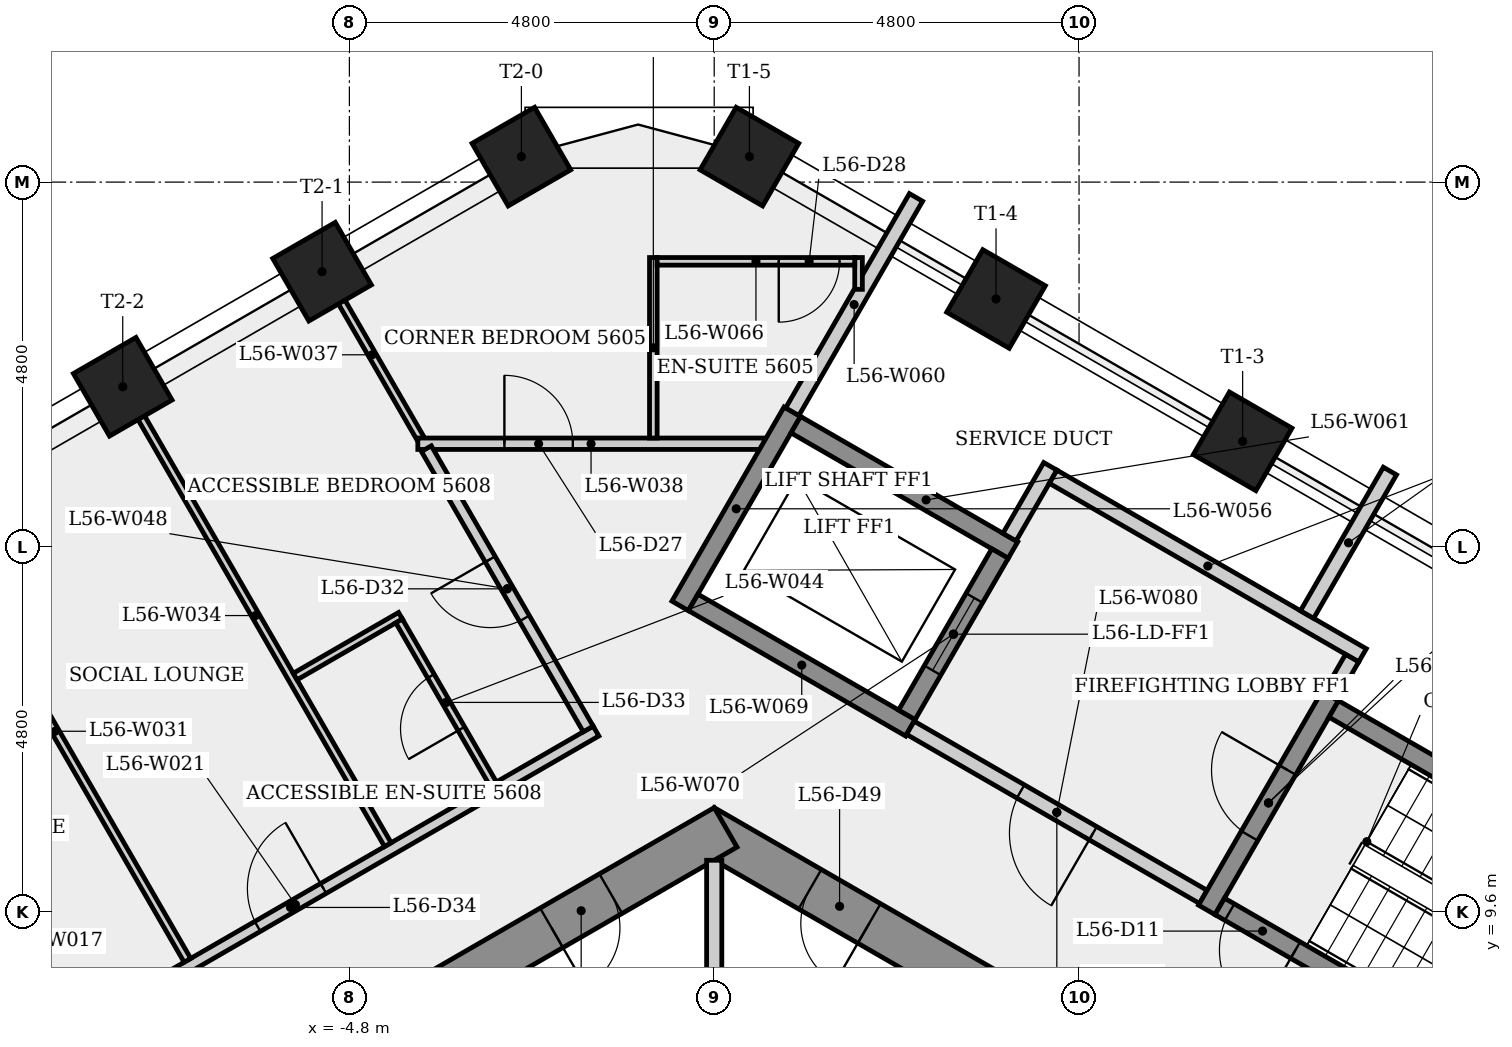
"""IFC4 building model, lengths in metres.
Left out: names, types, materials, properties, quantities, classifications, styles, units other than length and angle.
Written with IfcOpenShell. Run it as: python <this file> out.ifc"""

import sys

from ifc_helpers import new_model, si_unit, direction, frame, frame_2d, origin, origin_2d, place, context, subcontext, project, spatial, rectangle, extrude, element, fill, save


model = new_model("IFC4")
c1 = context("Model", 3, precision=1e-05, world=origin(), true_north=direction((0.0, 1.0)))
c2 = subcontext(c1, "Body", "Model", "MODEL_VIEW")
j1 = project(units=[si_unit("LENGTHUNIT", "METRE"), si_unit("PLANEANGLEUNIT", "RADIAN")], contexts=[c1])
p1 = place(None, origin())
s1 = spatial("IfcSite", under=j1, at=p1, CompositionType="ELEMENT")
p2 = place(p1, origin())
s2 = spatial("IfcBuilding", under=s1, at=p2, CompositionType="ELEMENT")
p3 = place(p2, frame((0.0, 0.0, 210.1)))
s3 = spatial("IfcBuildingStorey", under=s2, at=p3, CompositionType="ELEMENT", Elevation=210.1)
p4 = place(p3, frame((9.35, 5.225, 0.0), z_axis=(0.0, 0.0, 1.0), x_axis=(-0.866023993627, 0.500002442456, 0.0)))
e1 = element("IfcWall", 1, at=p4, inside=s3, PredefinedType="SHEAR", context=c2, shape_type="SweptSolid", body=[
    extrude(rectangle(XDim=10.97, YDim=0.6, at=frame_2d((5.485, 0.0))), origin(), (0.0, 0.0, 1.0), 4.0),
])
p5 = place(p4, frame((8.442, 0.0, 0.0)))
e2 = element("IfcOpeningElement", 2, at=p5, cuts=e1, PredefinedType="OPENING", context=c2, shape_type="SweptSolid", body=[
    extrude(rectangle(XDim=0.9, YDim=2.1, at=frame_2d((0.45, 1.05))), frame((0.0, 0.31, 0.0), z_axis=(0.0, -1.0, 0.0), x_axis=(1.0, 0.0, 0.0)), (0.0, 0.0, 1.0), 0.62),
])
p6 = place(p4, frame((1.634, 0.0, 0.0)))
e3 = element("IfcOpeningElement", 3, at=p6, cuts=e1, PredefinedType="OPENING", context=c2, shape_type="SweptSolid", body=[
    extrude(rectangle(XDim=0.9, YDim=2.1, at=frame_2d((0.45, 1.05))), frame((0.0, 0.31, 0.0), z_axis=(0.0, -1.0, 0.0), x_axis=(1.0, 0.0, 0.0)), (0.0, 0.0, 1.0), 0.62),
])
p7 = place(p3, frame((0.15, 10.71, 0.0), z_axis=(0.0, 0.0, 1.0), x_axis=(-0.866023993627, -0.500002442456, 0.0)))
e4 = element("IfcWall", 4, at=p7, inside=s3, PredefinedType="SHEAR", context=c2, shape_type="SweptSolid", body=[
    extrude(rectangle(XDim=10.97, YDim=0.6, at=frame_2d((5.485, 0.0))), origin(), (0.0, 0.0, 1.0), 4.0),
])
p8 = place(p7, frame((9.201, 0.0, 0.0)))
e5 = element("IfcOpeningElement", 5, at=p8, cuts=e4, PredefinedType="OPENING", context=c2, shape_type="SweptSolid", body=[
    extrude(rectangle(XDim=0.9, YDim=2.1, at=frame_2d((0.45, 1.05))), frame((0.0, 0.31, 0.0), z_axis=(0.0, -1.0, 0.0), x_axis=(1.0, 0.0, 0.0)), (0.0, 0.0, 1.0), 0.62),
])
p9 = place(p7, frame((1.744, 0.0, 0.0)))
e6 = element("IfcOpeningElement", 6, at=p9, cuts=e4, PredefinedType="OPENING", context=c2, shape_type="SweptSolid", body=[
    extrude(rectangle(XDim=0.9, YDim=2.1, at=frame_2d((0.45, 1.05))), frame((0.0, 0.31, 0.0), z_axis=(0.0, -1.0, 0.0), x_axis=(1.0, 0.0, 0.0)), (0.0, 0.0, 1.0), 0.62),
])
for number, where, z_axis, x_axis in (
    (7, (6.953, 15.789, 0.0), (0.0, 0.0, 1.0), (0.5, 0.866, 0.0)),
    (8, (3.708, 17.662, 0.0), (0.0, 0.0, 1.0), (0.5, 0.866, 0.0)),
    (9, (0.463, 19.535, 0.0), (0.0, 0.0, 1.0), (0.5, 0.866, 0.0)),
    (10, (-2.537, 19.535, 0.0), (0.0, 0.0, 1.0), (-0.5, 0.866, 0.0)),
    (11, (-5.159, 18.021, 0.0), (0.0, 0.0, 1.0), (-0.5, 0.866, 0.0)),
    (12, (-7.782, 16.507, 0.0), (0.0, 0.0, 1.0), (-0.5, 0.866, 0.0)),
):
    element("IfcColumn", number, at=place(p3, frame(where, z_axis=z_axis, x_axis=x_axis)), inside=s3, PredefinedType="COLUMN", context=c2, shape_type="SweptSolid", body=[
        extrude(rectangle(XDim=0.95, YDim=0.95, at=origin_2d()), origin(), (0.0, 0.0, 1.0), 4.0),
    ])
p10 = place(p3, frame((-9.465, 7.41, 0.0), z_axis=(0.0, 0.0, 1.0), x_axis=(0.866025334581, 0.500000119864, 0.0)))
e13 = element("IfcWall", 13, at=p10, inside=s3, PredefinedType="PARTITIONING", context=c2, shape_type="SweptSolid", body=[
    extrude(rectangle(XDim=9.133, YDim=0.15, at=frame_2d((4.567, 0.0))), origin(), (0.0, 0.0, 1.0), 3.6),
])
p11 = place(p10, frame((3.992, 0.0, 0.0)))
e14 = element("IfcOpeningElement", 14, at=p11, cuts=e13, PredefinedType="OPENING", context=c2, shape_type="SweptSolid", body=[
    extrude(rectangle(XDim=1.0, YDim=2.1, at=frame_2d((0.5, 1.05))), frame((0.0, 0.085, 0.0), z_axis=(0.0, -1.0, 0.0), x_axis=(1.0, 0.0, 0.0)), (0.0, 0.0, 1.0), 0.17),
])
p12 = place(p3, frame((-6.931, 8.96, 0.0), z_axis=(0.0, 0.0, 1.0), x_axis=(-0.499982511794, 0.866035500369, 0.0)))
e15 = element("IfcWall", 15, at=p12, inside=s3, PredefinedType="PARTITIONING", context=c2, shape_type="SweptSolid", body=[
    extrude(rectangle(XDim=6.962, YDim=0.1, at=frame_2d((3.481, 0.0))), origin(), (0.0, 0.0, 1.0), 3.6),
])
p13 = place(p3, frame((-7.775, 16.511, 0.0), z_axis=(0.0, 0.0, 1.0), x_axis=(0.499997697262, -0.866026733267, 0.0)))
e16 = element("IfcWall", 16, at=p13, inside=s3, PredefinedType="PARTITIONING", context=c2, shape_type="SweptSolid", body=[
    extrude(rectangle(XDim=6.961, YDim=0.1, at=frame_2d((3.481, 0.0))), origin(), (0.0, 0.0, 1.0), 3.6),
])
p14 = place(p3, frame((-4.128, 13.494, 0.0), z_axis=(0.0, 0.0, 1.0), x_axis=(-0.866094119867, -0.499880961361, 0.0)))
e17 = element("IfcWall", 17, at=p14, inside=s3, PredefinedType="PARTITIONING", context=c2, shape_type="SweptSolid", body=[
    extrude(rectangle(XDim=1.6, YDim=0.1, at=frame_2d((0.8, 0.0))), origin(), (0.0, 0.0, 1.0), 3.6),
])
p15 = place(p3, frame((-3.862, 15.823, 0.0), z_axis=(0.0, 0.0, 1.0), x_axis=(-0.5000066933, 0.866021539371, 0.0)))
e18 = element("IfcWall", 18, at=p15, inside=s3, PredefinedType="PARTITIONING", context=c2, shape_type="SweptSolid", body=[
    extrude(rectangle(XDim=2.553, YDim=0.1, at=frame_2d((1.276, 0.0))), origin(), (0.0, 0.0, 1.0), 3.6),
])
p16 = place(p3, frame((-3.899, 15.757, 0.0), z_axis=(0.0, 0.0, 1.0), x_axis=(1.0, 0.0, 0.0)))
e19 = element("IfcWall", 19, at=p16, inside=s3, PredefinedType="PARTITIONING", context=c2, shape_type="SweptSolid", body=[
    extrude(rectangle(XDim=4.558, YDim=0.15, at=frame_2d((2.279, 0.0))), origin(), (0.0, 0.0, 1.0), 3.6),
])
p17 = place(p16, frame((1.139, 0.0, 0.0)))
e20 = element("IfcOpeningElement", 20, at=p17, cuts=e19, PredefinedType="OPENING", context=c2, shape_type="SweptSolid", body=[
    extrude(rectangle(XDim=0.9, YDim=2.1, at=frame_2d((0.45, 1.05))), frame((0.0, 0.085, 0.0), z_axis=(0.0, -1.0, 0.0), x_axis=(1.0, 0.0, 0.0)), (0.0, 0.0, 1.0), 0.17),
])
p18 = place(p3, frame((-2.909, 11.282, 0.0), z_axis=(0.0, 0.0, 1.0), x_axis=(-0.499916002032, 0.866073894602, 0.0)))
e21 = element("IfcWall", 21, at=p18, inside=s3, PredefinedType="PARTITIONING", context=c2, shape_type="SweptSolid", body=[
    extrude(rectangle(XDim=2.475, YDim=0.1, at=frame_2d((1.238, 0.0))), origin(), (0.0, 0.0, 1.0), 3.6),
])
p19 = place(p18, frame((0.837, 0.0, 0.0)))
e22 = element("IfcOpeningElement", 22, at=p19, cuts=e21, PredefinedType="OPENING", context=c2, shape_type="SweptSolid", body=[
    extrude(rectangle(XDim=0.8, YDim=2.1, at=frame_2d((0.4, 1.05))), frame((0.0, 0.06, 0.0), z_axis=(0.0, -1.0, 0.0), x_axis=(1.0, 0.0, 0.0)), (0.0, 0.0, 1.0), 0.12),
])
p20 = place(p3, frame((-1.658, 12.004, 0.0), z_axis=(0.0, 0.0, 1.0), x_axis=(-0.500023511883, 0.866011828767, 0.0)))
e23 = element("IfcWall", 23, at=p20, inside=s3, PredefinedType="PARTITIONING", context=c2, shape_type="SweptSolid", body=[
    extrude(rectangle(XDim=4.259, YDim=0.15, at=frame_2d((2.129, 0.0))), origin(), (0.0, 0.0, 1.0), 3.6),
])
p21 = place(p20, frame((1.679, 0.0, 0.0)))
e24 = element("IfcOpeningElement", 24, at=p21, cuts=e23, PredefinedType="OPENING", context=c2, shape_type="SweptSolid", body=[
    extrude(rectangle(XDim=0.9, YDim=2.1, at=frame_2d((0.45, 1.05))), frame((0.0, 0.085, 0.0), z_axis=(0.0, -1.0, 0.0), x_axis=(1.0, 0.0, 0.0)), (0.0, 0.0, 1.0), 0.17),
])
p22 = place(p3, frame((-0.801, 18.208, 0.0), z_axis=(0.0, 0.0, 1.0), x_axis=(0.0, -1.0, 0.0)))
e25 = element("IfcWall", 25, at=p22, inside=s3, PredefinedType="PARTITIONING", context=c2, shape_type="SweptSolid", body=[
    extrude(rectangle(XDim=2.375, YDim=0.1, at=frame_2d((1.188, 0.0))), origin(), (0.0, 0.0, 1.0), 3.6),
])
p23 = place(p3, frame((-0.448, 13.624, 0.0), z_axis=(0.0, 0.0, 1.0), x_axis=(0.500037662692, 0.866003658127, 0.0)))
e26 = element("IfcWall", 26, at=p23, inside=s3, PredefinedType="SHEAR", context=c2, shape_type="SweptSolid", body=[
    extrude(rectangle(XDim=2.95, YDim=0.25, at=frame_2d((1.475, 0.0))), origin(), (0.0, 0.0, 1.0), 3.6),
])
p24 = place(p3, frame((0.0, 10.277, 0.0), z_axis=(0.0, 0.0, 1.0), x_axis=(0.0, -1.0, 0.0)))
e27 = element("IfcWall", 27, at=p24, inside=s3, PredefinedType="PARTITIONING", context=c2, shape_type="SweptSolid", body=[
    extrude(rectangle(XDim=5.002, YDim=0.2, at=frame_2d((2.501, 0.0))), origin(), (0.0, 0.0, 1.0), 3.6),
])
p25 = place(p3, frame((1.027, 16.179, 0.0), z_axis=(0.0, 0.0, 1.0), x_axis=(0.49995397877, 0.866051972524, 0.0)))
e28 = element("IfcWall", 28, at=p25, inside=s3, PredefinedType="PLUMBINGWALL", context=c2, shape_type="SweptSolid", body=[
    extrude(rectangle(XDim=3.256, YDim=0.2, at=frame_2d((1.628, 0.0))), origin(), (0.0, 0.0, 1.0), 3.6),
])
p26 = place(p3, frame((1.073, 16.008, 0.0), z_axis=(0.0, 0.0, 1.0), x_axis=(0.866040211805, -0.499974350878, 0.0)))
e29 = element("IfcWall", 29, at=p26, inside=s3, PredefinedType="SHEAR", context=c2, shape_type="SweptSolid", body=[
    extrude(rectangle(XDim=3.3, YDim=0.25, at=frame_2d((1.65, 0.0))), origin(), (0.0, 0.0, 1.0), 3.6),
])
p27 = place(p3, frame((1.899, 17.789, 0.0), z_axis=(0.0, 0.0, 1.0), x_axis=(0.0, 1.0, 0.0)))
e30 = element("IfcWall", 30, at=p27, inside=s3, PredefinedType="PARTITIONING", context=c2, shape_type="SweptSolid", body=[
    extrude(rectangle(XDim=0.418, YDim=0.1, at=frame_2d((0.209, 0.0))), origin(), (0.0, 0.0, 1.0), 3.6),
])
p28 = place(p3, frame((1.849, 18.157, 0.0), z_axis=(0.0, 0.0, 1.0), x_axis=(-1.0, 0.0, 0.0)))
e31 = element("IfcWall", 31, at=p28, inside=s3, PredefinedType="PARTITIONING", context=c2, shape_type="SweptSolid", body=[
    extrude(rectangle(XDim=2.6, YDim=0.1, at=frame_2d((1.3, 0.0))), origin(), (0.0, 0.0, 1.0), 3.6),
])
p29 = place(p28, frame((0.2, 0.0, 0.0)))
e32 = element("IfcOpeningElement", 32, at=p29, cuts=e31, PredefinedType="OPENING", context=c2, shape_type="SweptSolid", body=[
    extrude(rectangle(XDim=0.8, YDim=2.1, at=frame_2d((0.4, 1.05))), frame((0.0, 0.06, 0.0), z_axis=(0.0, -1.0, 0.0), x_axis=(1.0, 0.0, 0.0)), (0.0, 0.0, 1.0), 0.12),
])
p30 = place(p3, frame((2.581, 12.02, 0.0), z_axis=(0.0, 0.0, 1.0), x_axis=(-0.866040211805, 0.499974350878, 0.0)))
e33 = element("IfcWall", 33, at=p30, inside=s3, PredefinedType="SHEAR", context=c2, shape_type="SweptSolid", body=[
    extrude(rectangle(XDim=3.3, YDim=0.25, at=frame_2d((1.65, 0.0))), origin(), (0.0, 0.0, 1.0), 3.6),
])
p31 = place(p3, frame((2.535, 12.191, 0.0), z_axis=(0.0, 0.0, 1.0), x_axis=(0.500061746146, 0.865989751695, 0.0)))
e34 = element("IfcWall", 34, at=p31, inside=s3, PredefinedType="SHEAR", context=c2, shape_type="SweptSolid", body=[
    extrude(rectangle(XDim=2.45, YDim=0.25, at=frame_2d((1.225, 0.0))), origin(), (0.0, 0.0, 1.0), 4.0),
])
p32 = place(p31, frame((0.675, 0.0, 0.0)))
e35 = element("IfcOpeningElement", 35, at=p32, cuts=e34, PredefinedType="OPENING", context=c2, shape_type="SweptSolid", body=[
    extrude(rectangle(XDim=1.1, YDim=2.1, at=frame_2d((0.55, 1.05))), frame((0.0, 0.135, 0.0), z_axis=(0.0, -1.0, 0.0), x_axis=(1.0, 0.0, 0.0)), (0.0, 0.0, 1.0), 0.27),
])
p33 = place(p3, frame((3.885, 14.529, 0.0), z_axis=(0.0, 0.0, 1.0), x_axis=(0.499997628298, 0.866026773083, 0.0)))
e36 = element("IfcWall", 36, at=p33, inside=s3, PredefinedType="PLUMBINGWALL", context=c2, shape_type="SweptSolid", body=[
    extrude(rectangle(XDim=1.075, YDim=0.2, at=frame_2d((0.538, 0.0))), origin(), (0.0, 0.0, 1.0), 3.6),
])
p34 = place(p3, frame((4.459, 15.323, 0.0), z_axis=(0.0, 0.0, 1.0), x_axis=(0.866016039709, -0.500016218704, 0.0)))
e37 = element("IfcWall", 37, at=p34, inside=s3, PredefinedType="PLUMBINGWALL", context=c2, shape_type="SweptSolid", body=[
    extrude(rectangle(XDim=4.7, YDim=0.2, at=frame_2d((2.35, 0.0))), origin(), (0.0, 0.0, 1.0), 3.6),
])
p35 = place(p3, frame((6.435, 9.795, 0.0), z_axis=(0.0, 0.0, 1.0), x_axis=(-0.866012907634, 0.500021643343, 0.0)))
e38 = element("IfcWall", 38, at=p35, inside=s3, PredefinedType="PARTITIONING", context=c2, shape_type="SweptSolid", body=[
    extrude(rectangle(XDim=4.45, YDim=0.2, at=frame_2d((2.225, 0.0))), origin(), (0.0, 0.0, 1.0), 3.6),
])
p36 = place(p35, frame((1.675, 0.0, 0.0)))
e39 = element("IfcOpeningElement", 39, at=p36, cuts=e38, PredefinedType="OPENING", context=c2, shape_type="SweptSolid", body=[
    extrude(rectangle(XDim=1.1, YDim=2.1, at=frame_2d((0.55, 1.05))), frame((0.0, 0.11, 0.0), z_axis=(0.0, -1.0, 0.0), x_axis=(1.0, 0.0, 0.0)), (0.0, 0.0, 1.0), 0.22),
])
p37 = place(p3, frame((6.48, 9.624, 0.0), z_axis=(0.0, 0.0, 1.0), x_axis=(0.500017246033, 0.866015446554, 0.0)))
e40 = element("IfcWall", 40, at=p37, inside=s3, PredefinedType="SHEAR", context=c2, shape_type="SweptSolid", body=[
    extrude(rectangle(XDim=3.25, YDim=0.25, at=frame_2d((1.625, 0.0))), origin(), (0.0, 0.0, 1.0), 3.6),
])
p38 = place(p37, frame((1.125, 0.0, 0.0)))
e41 = element("IfcOpeningElement", 41, at=p38, cuts=e40, PredefinedType="OPENING", context=c2, shape_type="SweptSolid", body=[
    extrude(rectangle(XDim=1.0, YDim=2.1, at=frame_2d((0.5, 1.05))), frame((0.0, 0.135, 0.0), z_axis=(0.0, -1.0, 0.0), x_axis=(1.0, 0.0, 0.0)), (0.0, 0.0, 1.0), 0.27),
])
p39 = place(p3, frame((7.8, 13.51, 0.0), z_axis=(0.0, 0.0, 1.0), x_axis=(0.500016430238, 0.866015917575, 0.0)))
e42 = element("IfcWall", 42, at=p39, inside=s3, PredefinedType="PLUMBINGWALL", context=c2, shape_type="SweptSolid", body=[
    extrude(rectangle(XDim=2.181, YDim=0.2, at=frame_2d((1.09, 0.0))), origin(), (0.0, 0.0, 1.0), 3.6),
])
p40 = place(p3, frame((8.151, 12.268, 0.0), z_axis=(0.0, 0.0, 1.0), x_axis=(0.866025499775, -0.499999833739, 0.0)))
e43 = element("IfcWall", 43, at=p40, inside=s3, PredefinedType="SHEAR", context=c2, shape_type="SweptSolid", body=[
    extrude(rectangle(XDim=6.4, YDim=0.25, at=frame_2d((3.2, 0.0))), origin(), (0.0, 0.0, 1.0), 3.6),
])
p41 = place(p3, frame((8.393, 12.937, 0.0), z_axis=(0.0, 0.0, 1.0), x_axis=(-0.500065409566, -0.86598763626, 0.0)))
e44 = element("IfcWall", 44, at=p41, inside=s3, PredefinedType="PLUMBINGWALL", context=c2, shape_type="SweptSolid", body=[
    extrude(rectangle(XDim=0.575, YDim=0.2, at=frame_2d((0.288, 0.0))), origin(), (0.0, 0.0, 1.0), 3.6),
])
p42 = place(p3, frame((12.194, 6.47, 0.0), z_axis=(0.0, 0.0, 1.0), x_axis=(-0.866025499775, 0.499999833739, 0.0)))
e45 = element("IfcWall", 45, at=p42, inside=s3, PredefinedType="SHEAR", context=c2, shape_type="SweptSolid", body=[
    extrude(rectangle(XDim=6.4, YDim=0.25, at=frame_2d((3.2, 0.0))), origin(), (0.0, 0.0, 1.0), 3.6),
])
p43 = place(p42, frame((5.25, 0.0, 0.0)))
e46 = element("IfcOpeningElement", 46, at=p43, cuts=e45, PredefinedType="OPENING", context=c2, shape_type="SweptSolid", body=[
    extrude(rectangle(XDim=1.0, YDim=2.1, at=frame_2d((0.5, 1.05))), frame((0.0, 0.135, 0.0), z_axis=(0.0, -1.0, 0.0), x_axis=(1.0, 0.0, 0.0)), (0.0, 0.0, 1.0), 0.27),
])
p44 = place(p43, origin())
e47 = element("IfcDoor", 47, at=p44, inside=s3, OperationType="SINGLE_SWING_LEFT", PredefinedType="DOOR", context=c2, shape_type="SweptSolid", body=[
    extrude(rectangle(XDim=1.0, YDim=2.1, at=frame_2d((0.5, 1.05))), frame((0.0, 0.025, 0.0), z_axis=(0.0, -1.0, 0.0), x_axis=(1.0, 0.0, 0.0)), (0.0, 0.0, 1.0), 0.05),
])
fill(e46, e47)
p45 = place(p38, origin())
e48 = element("IfcDoor", 48, at=p45, inside=s3, OperationType="SINGLE_SWING_RIGHT", PredefinedType="DOOR", context=c2, shape_type="SweptSolid", body=[
    extrude(rectangle(XDim=1.0, YDim=2.1, at=frame_2d((0.5, 1.05))), frame((0.0, 0.025, 0.0), z_axis=(0.0, -1.0, 0.0), x_axis=(1.0, 0.0, 0.0)), (0.0, 0.0, 1.0), 0.05),
])
fill(e41, e48)
p46 = place(p36, origin())
e49 = element("IfcDoor", 49, at=p46, inside=s3, OperationType="SINGLE_SWING_LEFT", PredefinedType="DOOR", context=c2, shape_type="SweptSolid", body=[
    extrude(rectangle(XDim=1.1, YDim=2.1, at=frame_2d((0.55, 1.05))), frame((0.0, 0.025, 0.0), z_axis=(0.0, -1.0, 0.0), x_axis=(1.0, 0.0, 0.0)), (0.0, 0.0, 1.0), 0.05),
])
fill(e39, e49)
p47 = place(p32, origin())
e50 = element("IfcDoor", 50, at=p47, inside=s3, OperationType="SLIDING_TO_LEFT", PredefinedType="DOOR", context=c2, shape_type="SweptSolid", body=[
    extrude(rectangle(XDim=1.1, YDim=2.1, at=frame_2d((0.55, 1.05))), frame((0.0, 0.025, 0.0), z_axis=(0.0, -1.0, 0.0), x_axis=(1.0, 0.0, 0.0)), (0.0, 0.0, 1.0), 0.05),
])
fill(e35, e50)
p48 = place(p17, origin())
e51 = element("IfcDoor", 51, at=p48, inside=s3, OperationType="SINGLE_SWING_LEFT", PredefinedType="DOOR", context=c2, shape_type="SweptSolid", body=[
    extrude(rectangle(XDim=0.9, YDim=2.1, at=frame_2d((0.45, 1.05))), frame((0.0, 0.025, 0.0), z_axis=(0.0, -1.0, 0.0), x_axis=(1.0, 0.0, 0.0)), (0.0, 0.0, 1.0), 0.05),
])
fill(e20, e51)
p49 = place(p29, origin())
e52 = element("IfcDoor", 52, at=p49, inside=s3, OperationType="SINGLE_SWING_RIGHT", PredefinedType="DOOR", context=c2, shape_type="SweptSolid", body=[
    extrude(rectangle(XDim=0.8, YDim=2.1, at=frame_2d((0.4, 1.05))), frame((0.0, 0.025, 0.0), z_axis=(0.0, -1.0, 0.0), x_axis=(1.0, 0.0, 0.0)), (0.0, 0.0, 1.0), 0.05),
])
fill(e32, e52)
p50 = place(p21, origin())
e53 = element("IfcDoor", 53, at=p50, inside=s3, OperationType="SINGLE_SWING_RIGHT", PredefinedType="DOOR", context=c2, shape_type="SweptSolid", body=[
    extrude(rectangle(XDim=0.9, YDim=2.1, at=frame_2d((0.45, 1.05))), frame((0.0, 0.025, 0.0), z_axis=(0.0, -1.0, 0.0), x_axis=(1.0, 0.0, 0.0)), (0.0, 0.0, 1.0), 0.05),
])
fill(e24, e53)
p51 = place(p19, origin())
e54 = element("IfcDoor", 54, at=p51, inside=s3, OperationType="SINGLE_SWING_LEFT", PredefinedType="DOOR", context=c2, shape_type="SweptSolid", body=[
    extrude(rectangle(XDim=0.8, YDim=2.1, at=frame_2d((0.4, 1.05))), frame((0.0, 0.025, 0.0), z_axis=(0.0, -1.0, 0.0), x_axis=(1.0, 0.0, 0.0)), (0.0, 0.0, 1.0), 0.05),
])
fill(e22, e54)
p52 = place(p11, origin())
e55 = element("IfcDoor", 55, at=p52, inside=s3, OperationType="SINGLE_SWING_RIGHT", PredefinedType="DOOR", context=c2, shape_type="SweptSolid", body=[
    extrude(rectangle(XDim=1.0, YDim=2.1, at=frame_2d((0.5, 1.05))), frame((0.0, 0.025, 0.0), z_axis=(0.0, -1.0, 0.0), x_axis=(1.0, 0.0, 0.0)), (0.0, 0.0, 1.0), 0.05),
])
fill(e14, e55)
p53 = place(p9, origin())
e56 = element("IfcDoor", 56, at=p53, inside=s3, OperationType="SINGLE_SWING_RIGHT", PredefinedType="DOOR", context=c2, shape_type="SweptSolid", body=[
    extrude(rectangle(XDim=0.9, YDim=2.1, at=frame_2d((0.45, 1.05))), frame((0.0, 0.025, 0.0), z_axis=(0.0, -1.0, 0.0), x_axis=(1.0, 0.0, 0.0)), (0.0, 0.0, 1.0), 0.05),
])
fill(e6, e56)
p54 = place(p5, origin())
e57 = element("IfcDoor", 57, at=p54, inside=s3, OperationType="SINGLE_SWING_LEFT", PredefinedType="DOOR", context=c2, shape_type="SweptSolid", body=[
    extrude(rectangle(XDim=0.9, YDim=2.1, at=frame_2d((0.45, 1.05))), frame((0.0, 0.025, 0.0), z_axis=(0.0, -1.0, 0.0), x_axis=(1.0, 0.0, 0.0)), (0.0, 0.0, 1.0), 0.05),
])
fill(e2, e57)
save(model, sys.argv[1])
